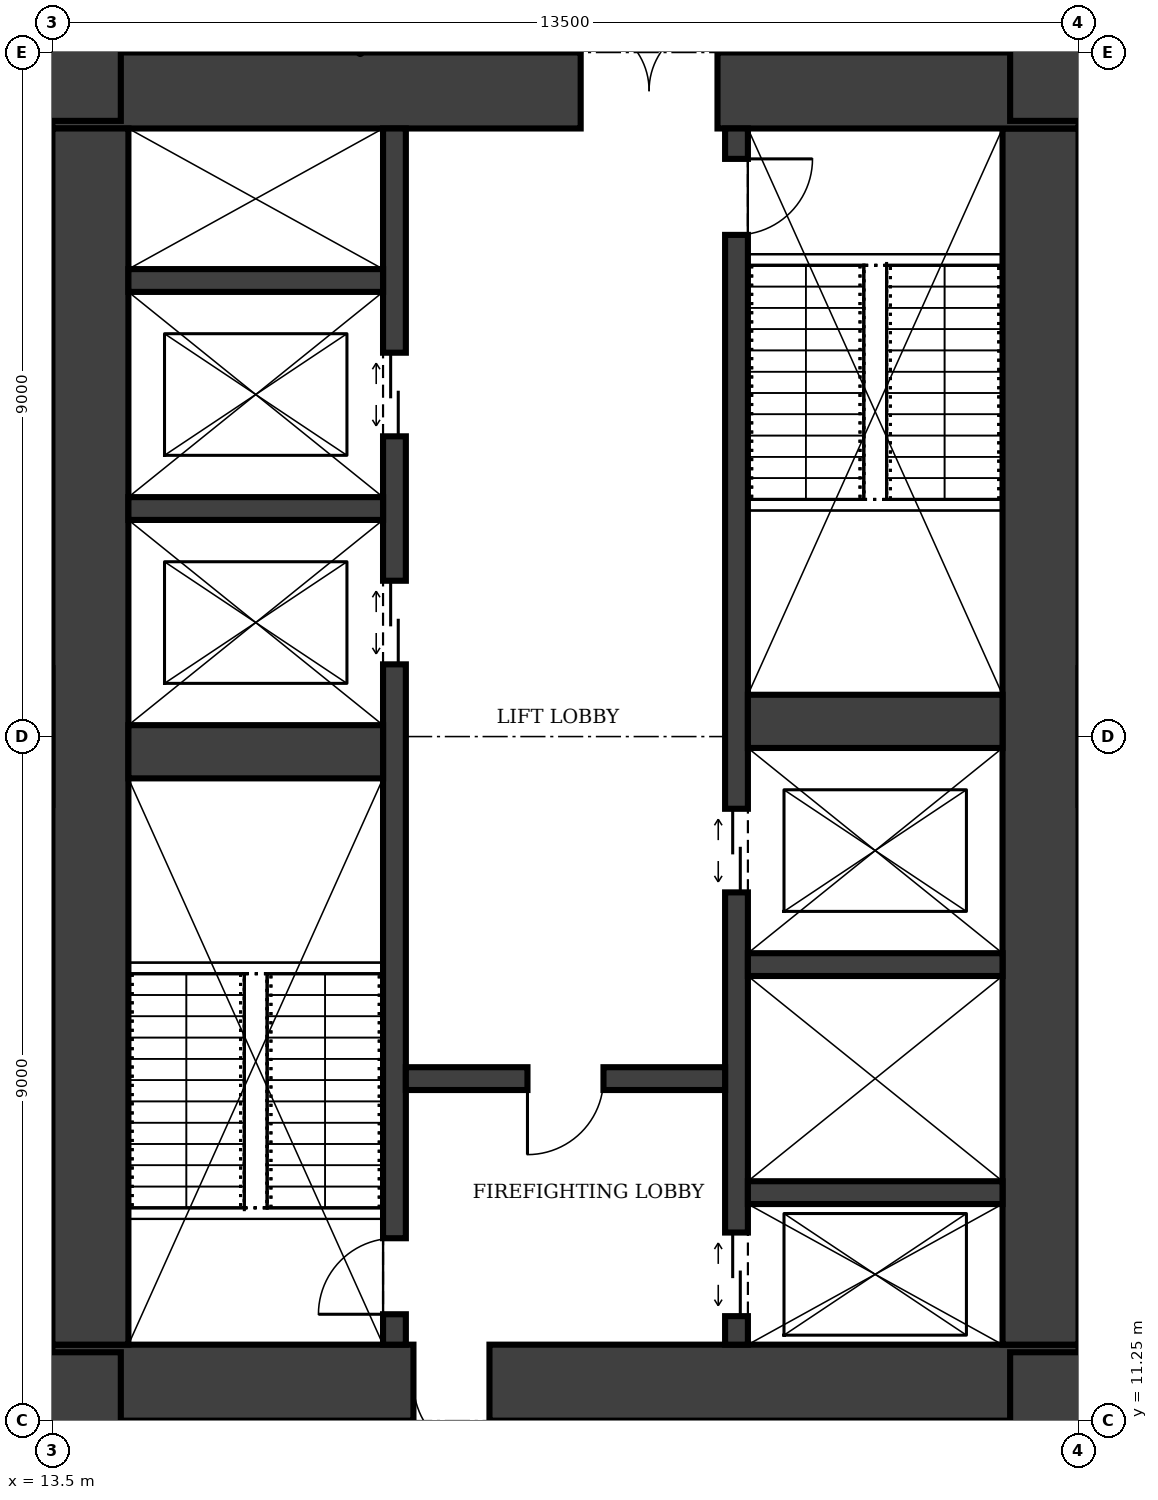
"""IFC4 building model, lengths in metres.
Left out: names, types, materials, properties, quantities, classifications, styles, units other than length and angle.
Written with IfcOpenShell. Run it as: python <this file> out.ifc"""

import sys

from ifc_helpers import new_model, si_unit, direction, frame, frame_2d, origin, place, context, subcontext, project, spatial, rectangle, extrude, element, fill, save


model = new_model("IFC4")
c1 = context("Model", 3, precision=1e-05, world=origin(), true_north=direction((0.0, 1.0)))
c2 = subcontext(c1, "Body", "Model", "MODEL_VIEW")
j1 = project(units=[si_unit("LENGTHUNIT", "METRE"), si_unit("PLANEANGLEUNIT", "RADIAN")], contexts=[c1])
p1 = place(None, origin())
s1 = spatial("IfcSite", under=j1, at=p1, CompositionType="ELEMENT")
p2 = place(p1, origin())
s2 = spatial("IfcBuilding", under=s1, at=p2, CompositionType="ELEMENT")
p3 = place(p2, frame((0.0, 0.0, 77.0)))
s3 = spatial("IfcBuildingStorey", under=s2, at=p3, CompositionType="ELEMENT", Elevation=77.0)
p4 = place(p3, frame((13.5, 11.75, 0.0), z_axis=(0.0, 0.0, 1.0), x_axis=(1.0, 0.0, 0.0)))
e1 = element("IfcWall", 1, at=p4, inside=s3, PredefinedType="SHEAR", context=c2, shape_type="SweptSolid", body=[
    extrude(rectangle(XDim=13.5, YDim=1.0, at=frame_2d((6.75, 0.0))), origin(), (0.0, 0.0, 1.0), 8.0),
])
p5 = place(p4, frame((4.75, 0.0, 0.0)))
e2 = element("IfcOpeningElement", 2, at=p5, cuts=e1, PredefinedType="OPENING", context=c2, shape_type="SweptSolid", body=[
    extrude(rectangle(XDim=1.0, YDim=2.1, at=frame_2d((0.5, 1.05))), frame((0.0, 0.51, 0.0), z_axis=(0.0, -1.0, 0.0), x_axis=(1.0, 0.0, 0.0)), (0.0, 0.0, 1.0), 1.02),
])
p6 = place(p3, frame((26.5, 12.25, 0.0), z_axis=(0.0, 0.0, 1.0), x_axis=(0.0, 1.0, 0.0)))
e3 = element("IfcWall", 3, at=p6, inside=s3, PredefinedType="SHEAR", context=c2, shape_type="SweptSolid", body=[
    extrude(rectangle(XDim=16.0, YDim=1.0, at=frame_2d((8.0, 0.0))), origin(), (0.0, 0.0, 1.0), 8.0),
])
p7 = place(p3, frame((27.0, 28.75, 0.0), z_axis=(0.0, 0.0, 1.0), x_axis=(-1.0, 0.0, 0.0)))
e4 = element("IfcWall", 4, at=p7, inside=s3, PredefinedType="SHEAR", context=c2, shape_type="SweptSolid", body=[
    extrude(rectangle(XDim=13.5, YDim=1.0, at=frame_2d((6.75, 0.0))), origin(), (0.0, 0.0, 1.0), 8.0),
])
p8 = place(p7, frame((4.75, 0.0, 0.0)))
e5 = element("IfcOpeningElement", 5, at=p8, cuts=e4, PredefinedType="OPENING", context=c2, shape_type="SweptSolid", body=[
    extrude(rectangle(XDim=1.8, YDim=2.1, at=frame_2d((0.9, 1.05))), frame((0.0, 0.51, 0.0), z_axis=(0.0, -1.0, 0.0), x_axis=(1.0, 0.0, 0.0)), (0.0, 0.0, 1.0), 1.02),
])
p9 = place(p3, frame((14.0, 28.25, 0.0), z_axis=(0.0, 0.0, 1.0), x_axis=(0.0, -1.0, 0.0)))
e6 = element("IfcWall", 6, at=p9, inside=s3, PredefinedType="SHEAR", context=c2, shape_type="SweptSolid", body=[
    extrude(rectangle(XDim=16.0, YDim=1.0, at=frame_2d((8.0, 0.0))), origin(), (0.0, 0.0, 1.0), 8.0),
])
p10 = place(p3, frame((18.0, 12.25, 0.0), z_axis=(0.0, 0.0, 1.0), x_axis=(0.0, 1.0, 0.0)))
e7 = element("IfcWall", 7, at=p10, inside=s3, PredefinedType="SHEAR", context=c2, shape_type="SweptSolid", body=[
    extrude(rectangle(XDim=16.0, YDim=0.3, at=frame_2d((8.0, 0.0))), origin(), (0.0, 0.0, 1.0), 8.0),
])
p11 = place(p10, frame((0.4, 0.0, 0.0)))
e8 = element("IfcOpeningElement", 8, at=p11, cuts=e7, PredefinedType="OPENING", context=c2, shape_type="SweptSolid", body=[
    extrude(rectangle(XDim=1.0, YDim=2.1, at=frame_2d((0.5, 1.05))), frame((0.0, 0.16, 0.0), z_axis=(0.0, -1.0, 0.0), x_axis=(1.0, 0.0, 0.0)), (0.0, 0.0, 1.0), 0.32),
])
p12 = place(p10, frame((8.95, 0.0, 0.0)))
e9 = element("IfcOpeningElement", 9, at=p12, cuts=e7, PredefinedType="OPENING", context=c2, shape_type="SweptSolid", body=[
    extrude(rectangle(XDim=1.1, YDim=2.1, at=frame_2d((0.55, 1.05))), frame((0.0, 0.16, 0.0), z_axis=(0.0, -1.0, 0.0), x_axis=(1.0, 0.0, 0.0)), (0.0, 0.0, 1.0), 0.32),
])
p13 = place(p10, frame((11.95, 0.0, 0.0)))
e10 = element("IfcOpeningElement", 10, at=p13, cuts=e7, PredefinedType="OPENING", context=c2, shape_type="SweptSolid", body=[
    extrude(rectangle(XDim=1.1, YDim=2.1, at=frame_2d((0.55, 1.05))), frame((0.0, 0.16, 0.0), z_axis=(0.0, -1.0, 0.0), x_axis=(1.0, 0.0, 0.0)), (0.0, 0.0, 1.0), 0.32),
])
p14 = place(p3, frame((22.5, 12.25, 0.0), z_axis=(0.0, 0.0, 1.0), x_axis=(0.0, 1.0, 0.0)))
e11 = element("IfcWall", 11, at=p14, inside=s3, PredefinedType="SHEAR", context=c2, shape_type="SweptSolid", body=[
    extrude(rectangle(XDim=16.0, YDim=0.3, at=frame_2d((8.0, 0.0))), origin(), (0.0, 0.0, 1.0), 8.0),
])
p15 = place(p14, frame((14.6, 0.0, 0.0)))
e12 = element("IfcOpeningElement", 12, at=p15, cuts=e11, PredefinedType="OPENING", context=c2, shape_type="SweptSolid", body=[
    extrude(rectangle(XDim=1.0, YDim=2.1, at=frame_2d((0.5, 1.05))), frame((0.0, 0.16, 0.0), z_axis=(0.0, -1.0, 0.0), x_axis=(1.0, 0.0, 0.0)), (0.0, 0.0, 1.0), 0.32),
])
p16 = place(p14, frame((0.375, 0.0, 0.0)))
e13 = element("IfcOpeningElement", 13, at=p16, cuts=e11, PredefinedType="OPENING", context=c2, shape_type="SweptSolid", body=[
    extrude(rectangle(XDim=1.1, YDim=2.1, at=frame_2d((0.55, 1.05))), frame((0.0, 0.16, 0.0), z_axis=(0.0, -1.0, 0.0), x_axis=(1.0, 0.0, 0.0)), (0.0, 0.0, 1.0), 0.32),
])
p17 = place(p14, frame((5.95, 0.0, 0.0)))
e14 = element("IfcOpeningElement", 14, at=p17, cuts=e11, PredefinedType="OPENING", context=c2, shape_type="SweptSolid", body=[
    extrude(rectangle(XDim=1.1, YDim=2.1, at=frame_2d((0.55, 1.05))), frame((0.0, 0.16, 0.0), z_axis=(0.0, -1.0, 0.0), x_axis=(1.0, 0.0, 0.0)), (0.0, 0.0, 1.0), 0.32),
])
p18 = place(p3, frame((14.5, 20.05, 0.0), z_axis=(0.0, 0.0, 1.0), x_axis=(1.0, 0.0, 0.0)))
e15 = element("IfcWall", 15, at=p18, inside=s3, PredefinedType="SHEAR", context=c2, shape_type="SweptSolid", body=[
    extrude(rectangle(XDim=3.35, YDim=0.7, at=frame_2d((1.675, 0.0))), origin(), (0.0, 0.0, 1.0), 8.0),
])
p19 = place(p3, frame((18.15, 15.75, 0.0), z_axis=(0.0, 0.0, 1.0), x_axis=(1.0, 0.0, 0.0)))
e16 = element("IfcWall", 16, at=p19, inside=s3, PredefinedType="SHEAR", context=c2, shape_type="SweptSolid", body=[
    extrude(rectangle(XDim=4.2, YDim=0.3, at=frame_2d((2.1, 0.0))), origin(), (0.0, 0.0, 1.0), 8.0),
])
p20 = place(p19, frame((1.6, 0.0, 0.0)))
e17 = element("IfcOpeningElement", 17, at=p20, cuts=e16, PredefinedType="OPENING", context=c2, shape_type="SweptSolid", body=[
    extrude(rectangle(XDim=1.0, YDim=2.1, at=frame_2d((0.5, 1.05))), frame((0.0, 0.16, 0.0), z_axis=(0.0, -1.0, 0.0), x_axis=(1.0, 0.0, 0.0)), (0.0, 0.0, 1.0), 0.32),
])
for number, where, z_axis, x_axis in (
    (18, (22.65, 14.25, 0.0), (0.0, 0.0, 1.0), (1.0, 0.0, 0.0)),
    (19, (22.65, 17.25, 0.0), (0.0, 0.0, 1.0), (1.0, 0.0, 0.0)),
):
    element("IfcWall", number, at=place(p3, frame(where, z_axis=z_axis, x_axis=x_axis)), inside=s3, PredefinedType="SHEAR", context=c2, shape_type="SweptSolid", body=[
        extrude(rectangle(XDim=3.35, YDim=0.3, at=frame_2d((1.675, 0.0))), origin(), (0.0, 0.0, 1.0), 8.0),
    ])
p21 = place(p3, frame((22.65, 20.45, 0.0), z_axis=(0.0, 0.0, 1.0), x_axis=(1.0, 0.0, 0.0)))
e20 = element("IfcWall", 20, at=p21, inside=s3, PredefinedType="SHEAR", context=c2, shape_type="SweptSolid", body=[
    extrude(rectangle(XDim=3.35, YDim=0.7, at=frame_2d((1.675, 0.0))), origin(), (0.0, 0.0, 1.0), 8.0),
])
for number, where, z_axis, x_axis in (
    (21, (14.5, 23.25, 0.0), (0.0, 0.0, 1.0), (1.0, 0.0, 0.0)),
    (22, (14.5, 26.25, 0.0), (0.0, 0.0, 1.0), (1.0, 0.0, 0.0)),
):
    element("IfcWall", number, at=place(p3, frame(where, z_axis=z_axis, x_axis=x_axis)), inside=s3, PredefinedType="SHEAR", context=c2, shape_type="SweptSolid", body=[
        extrude(rectangle(XDim=3.35, YDim=0.3, at=frame_2d((1.675, 0.0))), origin(), (0.0, 0.0, 1.0), 8.0),
    ])
p22 = place(p3, frame((13.5, 4.5, 0.0), z_axis=(0.0, 0.0, 1.0), x_axis=(0.0, 1.0, 0.0)))
e23 = element("IfcWall", 23, at=p22, inside=s3, PredefinedType="SHEAR", context=c2, shape_type="SweptSolid", body=[
    extrude(rectangle(XDim=7.65, YDim=1.8, at=frame_2d((3.825, 0.0))), origin(), (0.0, 0.0, 1.0), 8.0),
])
p23 = place(p22, frame((2.775, 0.0, 0.0)))
e24 = element("IfcOpeningElement", 24, at=p23, cuts=e23, PredefinedType="OPENING", context=c2, shape_type="SweptSolid", body=[
    extrude(rectangle(XDim=1.2, YDim=2.1, at=frame_2d((0.6, 1.05))), frame((0.0, 0.91, 0.0), z_axis=(0.0, -1.0, 0.0), x_axis=(1.0, 0.0, 0.0)), (0.0, 0.0, 1.0), 1.82),
])
p24 = place(p3, frame((27.0, 4.5, 0.0), z_axis=(0.0, 0.0, 1.0), x_axis=(0.0, 1.0, 0.0)))
e25 = element("IfcWall", 25, at=p24, inside=s3, PredefinedType="SHEAR", context=c2, shape_type="SweptSolid", body=[
    extrude(rectangle(XDim=7.65, YDim=1.8, at=frame_2d((3.825, 0.0))), origin(), (0.0, 0.0, 1.0), 8.0),
])
p25 = place(p24, frame((2.775, 0.0, 0.0)))
e26 = element("IfcOpeningElement", 26, at=p25, cuts=e25, PredefinedType="OPENING", context=c2, shape_type="SweptSolid", body=[
    extrude(rectangle(XDim=1.2, YDim=2.1, at=frame_2d((0.6, 1.05))), frame((0.0, 0.91, 0.0), z_axis=(0.0, -1.0, 0.0), x_axis=(1.0, 0.0, 0.0)), (0.0, 0.0, 1.0), 1.82),
])
p26 = place(p3, frame((13.5, 28.35, 0.0), z_axis=(0.0, 0.0, 1.0), x_axis=(0.0, 1.0, 0.0)))
e27 = element("IfcWall", 27, at=p26, inside=s3, PredefinedType="SHEAR", context=c2, shape_type="SweptSolid", body=[
    extrude(rectangle(XDim=7.65, YDim=1.8, at=frame_2d((3.825, 0.0))), origin(), (0.0, 0.0, 1.0), 8.0),
])
p27 = place(p26, frame((3.675, 0.0, 0.0)))
e28 = element("IfcOpeningElement", 28, at=p27, cuts=e27, PredefinedType="OPENING", context=c2, shape_type="SweptSolid", body=[
    extrude(rectangle(XDim=1.2, YDim=2.1, at=frame_2d((0.6, 1.05))), frame((0.0, 0.91, 0.0), z_axis=(0.0, -1.0, 0.0), x_axis=(1.0, 0.0, 0.0)), (0.0, 0.0, 1.0), 1.82),
])
p28 = place(p3, frame((27.0, 28.35, 0.0), z_axis=(0.0, 0.0, 1.0), x_axis=(0.0, 1.0, 0.0)))
e29 = element("IfcWall", 29, at=p28, inside=s3, PredefinedType="SHEAR", context=c2, shape_type="SweptSolid", body=[
    extrude(rectangle(XDim=7.65, YDim=1.8, at=frame_2d((3.825, 0.0))), origin(), (0.0, 0.0, 1.0), 8.0),
])
p29 = place(p28, frame((3.675, 0.0, 0.0)))
e30 = element("IfcOpeningElement", 30, at=p29, cuts=e29, PredefinedType="OPENING", context=c2, shape_type="SweptSolid", body=[
    extrude(rectangle(XDim=1.2, YDim=2.1, at=frame_2d((0.6, 1.05))), frame((0.0, 0.91, 0.0), z_axis=(0.0, -1.0, 0.0), x_axis=(1.0, 0.0, 0.0)), (0.0, 0.0, 1.0), 1.82),
])
p30 = place(p5, frame((1.0, 0.0, 0.0), z_axis=(0.0, 0.0, 1.0), x_axis=(-1.0, 0.0, 0.0)))
e31 = element("IfcDoor", 31, at=p30, inside=s3, OperationType="SINGLE_SWING_LEFT", PredefinedType="DOOR", context=c2, shape_type="SweptSolid", body=[
    extrude(rectangle(XDim=1.0, YDim=2.1, at=frame_2d((0.5, 1.05))), frame((0.0, 0.025, 0.0), z_axis=(0.0, -1.0, 0.0), x_axis=(1.0, 0.0, 0.0)), (0.0, 0.0, 1.0), 0.05),
])
fill(e2, e31)
p31 = place(p8, frame((1.8, 0.0, 0.0), z_axis=(0.0, 0.0, 1.0), x_axis=(-1.0, 0.0, 0.0)))
e32 = element("IfcDoor", 32, at=p31, inside=s3, OperationType="DOUBLE_DOOR_SINGLE_SWING", PredefinedType="DOOR", context=c2, shape_type="SweptSolid", body=[
    extrude(rectangle(XDim=1.8, YDim=2.1, at=frame_2d((0.9, 1.05))), frame((0.0, 0.025, 0.0), z_axis=(0.0, -1.0, 0.0), x_axis=(1.0, 0.0, 0.0)), (0.0, 0.0, 1.0), 0.05),
])
fill(e5, e32)
p32 = place(p20, frame((1.0, 0.0, 0.0), z_axis=(0.0, 0.0, 1.0), x_axis=(-1.0, 0.0, 0.0)))
e33 = element("IfcDoor", 33, at=p32, inside=s3, OperationType="SINGLE_SWING_RIGHT", PredefinedType="DOOR", context=c2, shape_type="SweptSolid", body=[
    extrude(rectangle(XDim=1.0, YDim=2.1, at=frame_2d((0.5, 1.05))), frame((0.0, 0.025, 0.0), z_axis=(0.0, -1.0, 0.0), x_axis=(1.0, 0.0, 0.0)), (0.0, 0.0, 1.0), 0.05),
])
fill(e17, e33)
p33 = place(p11, origin())
e34 = element("IfcDoor", 34, at=p33, inside=s3, OperationType="SINGLE_SWING_LEFT", PredefinedType="DOOR", context=c2, shape_type="SweptSolid", body=[
    extrude(rectangle(XDim=1.0, YDim=2.1, at=frame_2d((0.5, 1.05))), frame((0.0, 0.025, 0.0), z_axis=(0.0, -1.0, 0.0), x_axis=(1.0, 0.0, 0.0)), (0.0, 0.0, 1.0), 0.05),
])
fill(e8, e34)
p34 = place(p15, frame((1.0, 0.0, 0.0), z_axis=(0.0, 0.0, 1.0), x_axis=(-1.0, 0.0, 0.0)))
e35 = element("IfcDoor", 35, at=p34, inside=s3, OperationType="SINGLE_SWING_LEFT", PredefinedType="DOOR", context=c2, shape_type="SweptSolid", body=[
    extrude(rectangle(XDim=1.0, YDim=2.1, at=frame_2d((0.5, 1.05))), frame((0.0, 0.025, 0.0), z_axis=(0.0, -1.0, 0.0), x_axis=(1.0, 0.0, 0.0)), (0.0, 0.0, 1.0), 0.05),
])
fill(e12, e35)
p35 = place(p16, origin())
e36 = element("IfcDoor", 36, at=p35, inside=s3, OperationType="DOUBLE_DOOR_SLIDING", PredefinedType="DOOR", context=c2, shape_type="SweptSolid", body=[
    extrude(rectangle(XDim=1.1, YDim=2.1, at=frame_2d((0.55, 1.05))), frame((0.0, 0.025, 0.0), z_axis=(0.0, -1.0, 0.0), x_axis=(1.0, 0.0, 0.0)), (0.0, 0.0, 1.0), 0.05),
])
fill(e13, e36)
p36 = place(p12, origin())
e37 = element("IfcDoor", 37, at=p36, inside=s3, OperationType="DOUBLE_DOOR_SLIDING", PredefinedType="DOOR", context=c2, shape_type="SweptSolid", body=[
    extrude(rectangle(XDim=1.1, YDim=2.1, at=frame_2d((0.55, 1.05))), frame((0.0, 0.025, 0.0), z_axis=(0.0, -1.0, 0.0), x_axis=(1.0, 0.0, 0.0)), (0.0, 0.0, 1.0), 0.05),
])
fill(e9, e37)
p37 = place(p13, origin())
e38 = element("IfcDoor", 38, at=p37, inside=s3, OperationType="DOUBLE_DOOR_SLIDING", PredefinedType="DOOR", context=c2, shape_type="SweptSolid", body=[
    extrude(rectangle(XDim=1.1, YDim=2.1, at=frame_2d((0.55, 1.05))), frame((0.0, 0.025, 0.0), z_axis=(0.0, -1.0, 0.0), x_axis=(1.0, 0.0, 0.0)), (0.0, 0.0, 1.0), 0.05),
])
fill(e10, e38)
p38 = place(p17, origin())
e39 = element("IfcDoor", 39, at=p38, inside=s3, OperationType="DOUBLE_DOOR_SLIDING", PredefinedType="DOOR", context=c2, shape_type="SweptSolid", body=[
    extrude(rectangle(XDim=1.1, YDim=2.1, at=frame_2d((0.55, 1.05))), frame((0.0, 0.025, 0.0), z_axis=(0.0, -1.0, 0.0), x_axis=(1.0, 0.0, 0.0)), (0.0, 0.0, 1.0), 0.05),
])
fill(e14, e39)
save(model, sys.argv[1])
